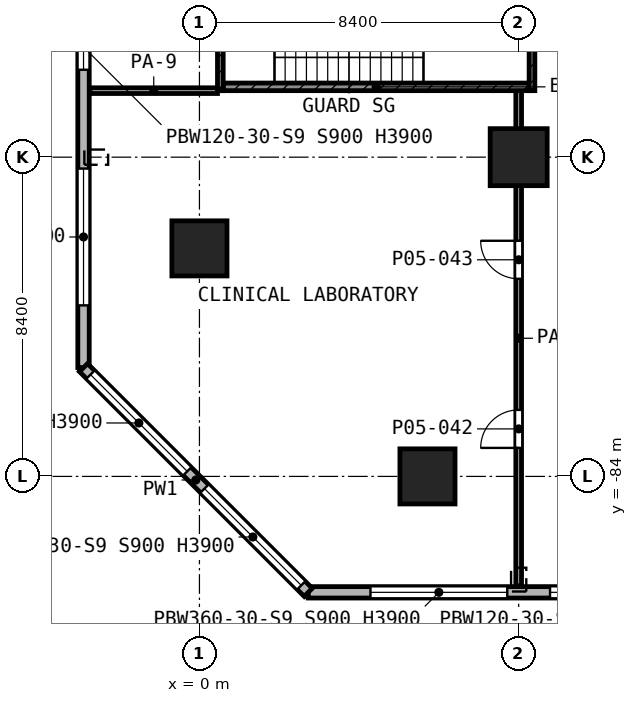
"""IFC4 building model, lengths in metres.
Left out: names, types, materials, properties, quantities, classifications, styles, units other than length and angle.
Written with IfcOpenShell. Run it as: python <this file> out.ifc"""

import sys

from ifc_helpers import new_model, si_unit, direction, frame, frame_2d, origin, origin_2d, place, context, subcontext, project, spatial, rectangle, extrude, element, fill, save


model = new_model("IFC4")
c1 = context("Model", 3, precision=1e-05, world=origin(), true_north=direction((0.0, 1.0)))
c2 = subcontext(c1, "Body", "Model", "MODEL_VIEW")
j1 = project(units=[si_unit("LENGTHUNIT", "METRE"), si_unit("PLANEANGLEUNIT", "RADIAN")], contexts=[c1])
p1 = place(None, origin())
s1 = spatial("IfcSite", under=j1, at=p1, CompositionType="ELEMENT")
p2 = place(p1, origin())
s2 = spatial("IfcBuilding", under=s1, at=p2, CompositionType="ELEMENT")
p3 = place(p2, frame((0.0, 0.0, 23.8)))
s3 = spatial("IfcBuildingStorey", under=s2, at=p3, CompositionType="ELEMENT", Elevation=23.8)
p4 = place(p3, frame((8.4, -75.6, 0.0), z_axis=(0.0, 0.0, 1.0), x_axis=(1.0, 0.0, 0.0)))
e1 = element("IfcColumn", 1, at=p4, inside=s3, PredefinedType="COLUMN", context=c2, shape_type="SweptSolid", body=[
    extrude(rectangle(XDim=1.5, YDim=1.5, at=origin_2d()), origin(), (0.0, 0.0, 1.0), 5.2),
])
for number, where, z_axis, x_axis in (
    (2, (0.0, -78.0, 0.0), (0.0, 0.0, 1.0), (1.0, 0.0, 0.0)),
    (3, (6.0, -84.0, 0.0), (0.0, 0.0, 1.0), (1.0, 0.0, 0.0)),
):
    element("IfcColumn", number, at=place(p3, frame(where, z_axis=z_axis, x_axis=x_axis)), inside=s3, PredefinedType="COLUMN", context=c2, shape_type="SweptSolid", body=[
        extrude(rectangle(XDim=1.45, YDim=1.45, at=origin_2d()), origin(), (0.0, 0.0, 1.0), 5.2),
    ])
p5 = place(p3, frame((-3.05, -2.862, 0.0), z_axis=(0.0, 0.0, 1.0), x_axis=(0.0, -1.0, 0.0)))
e4 = element("IfcWall", 4, at=p5, inside=s3, PredefinedType="SOLIDWALL", context=c2, shape_type="SweptSolid", body=[
    extrude(rectangle(XDim=78.276, YDim=0.3, at=frame_2d((39.138, 0.0))), origin(), (0.0, 0.0, 1.0), 4.85),
])
p6 = place(p5, frame((1.638, 0.0, 0.9)))
e5 = element("IfcOpeningElement", 5, at=p6, cuts=e4, PredefinedType="OPENING", context=c2, shape_type="SweptSolid", body=[
    extrude(rectangle(XDim=3.6, YDim=3.0, at=frame_2d((1.8, 1.5))), frame((0.0, 0.16, 0.0), z_axis=(0.0, -1.0, 0.0), x_axis=(1.0, 0.0, 0.0)), (0.0, 0.0, 1.0), 0.32),
])
p7 = place(p5, frame((5.838, 0.0, 0.9)))
e6 = element("IfcOpeningElement", 6, at=p7, cuts=e4, PredefinedType="OPENING", context=c2, shape_type="SweptSolid", body=[
    extrude(rectangle(XDim=3.6, YDim=3.0, at=frame_2d((1.8, 1.5))), frame((0.0, 0.16, 0.0), z_axis=(0.0, -1.0, 0.0), x_axis=(1.0, 0.0, 0.0)), (0.0, 0.0, 1.0), 0.32),
])
p8 = place(p5, frame((10.038, 0.0, 0.9)))
e7 = element("IfcOpeningElement", 7, at=p8, cuts=e4, PredefinedType="OPENING", context=c2, shape_type="SweptSolid", body=[
    extrude(rectangle(XDim=3.6, YDim=3.0, at=frame_2d((1.8, 1.5))), frame((0.0, 0.16, 0.0), z_axis=(0.0, -1.0, 0.0), x_axis=(1.0, 0.0, 0.0)), (0.0, 0.0, 1.0), 0.32),
])
p9 = place(p5, frame((14.238, 0.0, 0.9)))
e8 = element("IfcOpeningElement", 8, at=p9, cuts=e4, PredefinedType="OPENING", context=c2, shape_type="SweptSolid", body=[
    extrude(rectangle(XDim=3.6, YDim=3.0, at=frame_2d((1.8, 1.5))), frame((0.0, 0.16, 0.0), z_axis=(0.0, -1.0, 0.0), x_axis=(1.0, 0.0, 0.0)), (0.0, 0.0, 1.0), 0.32),
])
p10 = place(p5, frame((18.438, 0.0, 0.9)))
e9 = element("IfcOpeningElement", 9, at=p10, cuts=e4, PredefinedType="OPENING", context=c2, shape_type="SweptSolid", body=[
    extrude(rectangle(XDim=3.6, YDim=3.0, at=frame_2d((1.8, 1.5))), frame((0.0, 0.16, 0.0), z_axis=(0.0, -1.0, 0.0), x_axis=(1.0, 0.0, 0.0)), (0.0, 0.0, 1.0), 0.32),
])
p11 = place(p5, frame((22.638, 0.0, 0.9)))
e10 = element("IfcOpeningElement", 10, at=p11, cuts=e4, PredefinedType="OPENING", context=c2, shape_type="SweptSolid", body=[
    extrude(rectangle(XDim=3.6, YDim=3.0, at=frame_2d((1.8, 1.5))), frame((0.0, 0.16, 0.0), z_axis=(0.0, -1.0, 0.0), x_axis=(1.0, 0.0, 0.0)), (0.0, 0.0, 1.0), 0.32),
])
p12 = place(p5, frame((27.653, 0.0, 0.9)))
e11 = element("IfcOpeningElement", 11, at=p12, cuts=e4, PredefinedType="OPENING", context=c2, shape_type="SweptSolid", body=[
    extrude(rectangle(XDim=2.4, YDim=3.0, at=frame_2d((1.2, 1.5))), frame((0.0, 0.16, 0.0), z_axis=(0.0, -1.0, 0.0), x_axis=(1.0, 0.0, 0.0)), (0.0, 0.0, 1.0), 0.32),
])
p13 = place(p5, frame((31.553, 0.0, 0.9)))
e12 = element("IfcOpeningElement", 12, at=p13, cuts=e4, PredefinedType="OPENING", context=c2, shape_type="SweptSolid", body=[
    extrude(rectangle(XDim=2.4, YDim=3.0, at=frame_2d((1.2, 1.5))), frame((0.0, 0.16, 0.0), z_axis=(0.0, -1.0, 0.0), x_axis=(1.0, 0.0, 0.0)), (0.0, 0.0, 1.0), 0.32),
])
p14 = place(p5, frame((35.238, 0.0, 0.9)))
e13 = element("IfcOpeningElement", 13, at=p14, cuts=e4, PredefinedType="OPENING", context=c2, shape_type="SweptSolid", body=[
    extrude(rectangle(XDim=3.6, YDim=3.0, at=frame_2d((1.8, 1.5))), frame((0.0, 0.16, 0.0), z_axis=(0.0, -1.0, 0.0), x_axis=(1.0, 0.0, 0.0)), (0.0, 0.0, 1.0), 0.32),
])
p15 = place(p5, frame((39.438, 0.0, 0.9)))
e14 = element("IfcOpeningElement", 14, at=p15, cuts=e4, PredefinedType="OPENING", context=c2, shape_type="SweptSolid", body=[
    extrude(rectangle(XDim=3.6, YDim=3.0, at=frame_2d((1.8, 1.5))), frame((0.0, 0.16, 0.0), z_axis=(0.0, -1.0, 0.0), x_axis=(1.0, 0.0, 0.0)), (0.0, 0.0, 1.0), 0.32),
])
p16 = place(p5, frame((44.323, 0.0, 0.9)))
e15 = element("IfcOpeningElement", 15, at=p16, cuts=e4, PredefinedType="OPENING", context=c2, shape_type="SweptSolid", body=[
    extrude(rectangle(XDim=2.4, YDim=3.0, at=frame_2d((1.2, 1.5))), frame((0.0, 0.16, 0.0), z_axis=(0.0, -1.0, 0.0), x_axis=(1.0, 0.0, 0.0)), (0.0, 0.0, 1.0), 0.32),
])
p17 = place(p5, frame((48.203, 0.0, 0.9)))
e16 = element("IfcOpeningElement", 16, at=p17, cuts=e4, PredefinedType="OPENING", context=c2, shape_type="SweptSolid", body=[
    extrude(rectangle(XDim=2.4, YDim=3.0, at=frame_2d((1.2, 1.5))), frame((0.0, 0.16, 0.0), z_axis=(0.0, -1.0, 0.0), x_axis=(1.0, 0.0, 0.0)), (0.0, 0.0, 1.0), 0.32),
])
p18 = place(p5, frame((52.038, 0.0, 0.9)))
e17 = element("IfcOpeningElement", 17, at=p18, cuts=e4, PredefinedType="OPENING", context=c2, shape_type="SweptSolid", body=[
    extrude(rectangle(XDim=3.6, YDim=3.0, at=frame_2d((1.8, 1.5))), frame((0.0, 0.16, 0.0), z_axis=(0.0, -1.0, 0.0), x_axis=(1.0, 0.0, 0.0)), (0.0, 0.0, 1.0), 0.32),
])
p19 = place(p5, frame((56.238, 0.0, 0.9)))
e18 = element("IfcOpeningElement", 18, at=p19, cuts=e4, PredefinedType="OPENING", context=c2, shape_type="SweptSolid", body=[
    extrude(rectangle(XDim=3.6, YDim=3.0, at=frame_2d((1.8, 1.5))), frame((0.0, 0.16, 0.0), z_axis=(0.0, -1.0, 0.0), x_axis=(1.0, 0.0, 0.0)), (0.0, 0.0, 1.0), 0.32),
])
p20 = place(p5, frame((60.438, 0.0, 0.9)))
e19 = element("IfcOpeningElement", 19, at=p20, cuts=e4, PredefinedType="OPENING", context=c2, shape_type="SweptSolid", body=[
    extrude(rectangle(XDim=3.6, YDim=3.0, at=frame_2d((1.8, 1.5))), frame((0.0, 0.16, 0.0), z_axis=(0.0, -1.0, 0.0), x_axis=(1.0, 0.0, 0.0)), (0.0, 0.0, 1.0), 0.32),
])
p21 = place(p5, frame((64.638, 0.0, 0.9)))
e20 = element("IfcOpeningElement", 20, at=p21, cuts=e4, PredefinedType="OPENING", context=c2, shape_type="SweptSolid", body=[
    extrude(rectangle(XDim=3.6, YDim=3.0, at=frame_2d((1.8, 1.5))), frame((0.0, 0.16, 0.0), z_axis=(0.0, -1.0, 0.0), x_axis=(1.0, 0.0, 0.0)), (0.0, 0.0, 1.0), 0.32),
])
p22 = place(p5, frame((69.238, 0.0, 0.9)))
e21 = element("IfcOpeningElement", 21, at=p22, cuts=e4, PredefinedType="OPENING", context=c2, shape_type="SweptSolid", body=[
    extrude(rectangle(XDim=1.2, YDim=3.0, at=frame_2d((0.6, 1.5))), frame((0.0, 0.16, 0.0), z_axis=(0.0, -1.0, 0.0), x_axis=(1.0, 0.0, 0.0)), (0.0, 0.0, 1.0), 0.32),
])
p23 = place(p5, frame((73.038, 0.0, 0.9)))
e22 = element("IfcOpeningElement", 22, at=p23, cuts=e4, PredefinedType="OPENING", context=c2, shape_type="SweptSolid", body=[
    extrude(rectangle(XDim=3.6, YDim=3.0, at=frame_2d((1.8, 1.5))), frame((0.0, 0.16, 0.0), z_axis=(0.0, -1.0, 0.0), x_axis=(1.0, 0.0, 0.0)), (0.0, 0.0, 1.0), 0.32),
])
p24 = place(p3, frame((-3.05, -81.138, 0.0), z_axis=(0.0, 0.0, 1.0), x_axis=(0.707106781187, -0.707106781187, 0.0)))
e23 = element("IfcWall", 23, at=p24, inside=s3, PredefinedType="SOLIDWALL", context=c2, shape_type="SweptSolid", body=[
    extrude(rectangle(XDim=8.361, YDim=0.3, at=frame_2d((4.181, 0.0))), origin(), (0.0, 0.0, 1.0), 4.85),
])
p25 = place(p24, frame((0.259, 0.0, 0.9)))
e24 = element("IfcOpeningElement", 24, at=p25, cuts=e23, PredefinedType="OPENING", context=c2, shape_type="SweptSolid", body=[
    extrude(rectangle(XDim=3.6, YDim=3.0, at=frame_2d((1.8, 1.5))), frame((0.0, 0.16, 0.0), z_axis=(0.0, -1.0, 0.0), x_axis=(1.0, 0.0, 0.0)), (0.0, 0.0, 1.0), 0.32),
])
p26 = place(p24, frame((4.502, 0.0, 0.9)))
e25 = element("IfcOpeningElement", 25, at=p26, cuts=e23, PredefinedType="OPENING", context=c2, shape_type="SweptSolid", body=[
    extrude(rectangle(XDim=3.6, YDim=3.0, at=frame_2d((1.8, 1.5))), frame((0.0, 0.16, 0.0), z_axis=(0.0, -1.0, 0.0), x_axis=(1.0, 0.0, 0.0)), (0.0, 0.0, 1.0), 0.32),
])
p27 = place(p3, frame((2.862, -87.05, 0.0), z_axis=(0.0, 0.0, 1.0), x_axis=(1.0, 0.0, 0.0)))
e26 = element("IfcWall", 26, at=p27, inside=s3, PredefinedType="SOLIDWALL", context=c2, shape_type="SweptSolid", body=[
    extrude(rectangle(XDim=27.876, YDim=0.3, at=frame_2d((13.938, 0.0))), origin(), (0.0, 0.0, 1.0), 4.85),
])
p28 = place(p27, frame((1.638, 0.0, 0.9)))
e27 = element("IfcOpeningElement", 27, at=p28, cuts=e26, PredefinedType="OPENING", context=c2, shape_type="SweptSolid", body=[
    extrude(rectangle(XDim=3.6, YDim=3.0, at=frame_2d((1.8, 1.5))), frame((0.0, 0.16, 0.0), z_axis=(0.0, -1.0, 0.0), x_axis=(1.0, 0.0, 0.0)), (0.0, 0.0, 1.0), 0.32),
])
p29 = place(p27, frame((6.363, 0.0, 0.9)))
e28 = element("IfcOpeningElement", 28, at=p29, cuts=e26, PredefinedType="OPENING", context=c2, shape_type="SweptSolid", body=[
    extrude(rectangle(XDim=1.2, YDim=3.0, at=frame_2d((0.6, 1.5))), frame((0.0, 0.16, 0.0), z_axis=(0.0, -1.0, 0.0), x_axis=(1.0, 0.0, 0.0)), (0.0, 0.0, 1.0), 0.32),
])
p30 = place(p27, frame((10.038, 0.0, 0.9)))
e29 = element("IfcOpeningElement", 29, at=p30, cuts=e26, PredefinedType="OPENING", context=c2, shape_type="SweptSolid", body=[
    extrude(rectangle(XDim=3.6, YDim=3.0, at=frame_2d((1.8, 1.5))), frame((0.0, 0.16, 0.0), z_axis=(0.0, -1.0, 0.0), x_axis=(1.0, 0.0, 0.0)), (0.0, 0.0, 1.0), 0.32),
])
p31 = place(p27, frame((14.238, 0.0, 0.9)))
e30 = element("IfcOpeningElement", 30, at=p31, cuts=e26, PredefinedType="OPENING", context=c2, shape_type="SweptSolid", body=[
    extrude(rectangle(XDim=3.6, YDim=3.0, at=frame_2d((1.8, 1.5))), frame((0.0, 0.16, 0.0), z_axis=(0.0, -1.0, 0.0), x_axis=(1.0, 0.0, 0.0)), (0.0, 0.0, 1.0), 0.32),
])
p32 = place(p27, frame((18.438, 0.0, 0.9)))
e31 = element("IfcOpeningElement", 31, at=p32, cuts=e26, PredefinedType="OPENING", context=c2, shape_type="SweptSolid", body=[
    extrude(rectangle(XDim=3.6, YDim=3.0, at=frame_2d((1.8, 1.5))), frame((0.0, 0.16, 0.0), z_axis=(0.0, -1.0, 0.0), x_axis=(1.0, 0.0, 0.0)), (0.0, 0.0, 1.0), 0.32),
])
p33 = place(p27, frame((22.638, 0.0, 0.9)))
e32 = element("IfcOpeningElement", 32, at=p33, cuts=e26, PredefinedType="OPENING", context=c2, shape_type="SweptSolid", body=[
    extrude(rectangle(XDim=3.6, YDim=3.0, at=frame_2d((1.8, 1.5))), frame((0.0, 0.16, 0.0), z_axis=(0.0, -1.0, 0.0), x_axis=(1.0, 0.0, 0.0)), (0.0, 0.0, 1.0), 0.32),
])
p34 = place(p3, frame((0.55, -73.85, 0.0), z_axis=(0.0, 0.0, 1.0), x_axis=(0.0, 1.0, 0.0)))
e33 = element("IfcWall", 33, at=p34, inside=s3, PredefinedType="SHEAR", context=c2, shape_type="SweptSolid", body=[
    extrude(rectangle(XDim=5.95, YDim=0.15, at=frame_2d((2.975, 0.0))), origin(), (0.0, 0.0, 1.0), 4.85),
])
p35 = place(p3, frame((8.75, -73.85, 0.0), z_axis=(0.0, 0.0, 1.0), x_axis=(0.0, 1.0, 0.0)))
e34 = element("IfcWall", 34, at=p35, inside=s3, PredefinedType="SHEAR", context=c2, shape_type="SweptSolid", body=[
    extrude(rectangle(XDim=5.9, YDim=0.15, at=frame_2d((2.95, 0.0))), origin(), (0.0, 0.0, 1.0), 4.85),
])
p36 = place(p35, frame((3.925, 0.0, 0.0)))
e35 = element("IfcOpeningElement", 35, at=p36, cuts=e34, PredefinedType="OPENING", context=c2, shape_type="SweptSolid", body=[
    extrude(rectangle(XDim=1.1, YDim=2.1, at=frame_2d((0.55, 1.05))), frame((0.0, 0.085, 0.0), z_axis=(0.0, -1.0, 0.0), x_axis=(1.0, 0.0, 0.0)), (0.0, 0.0, 1.0), 0.17),
])
p37 = place(p3, frame((0.625, -73.75, 0.0), z_axis=(0.0, 0.0, 1.0), x_axis=(1.0, 0.0, 0.0)))
e36 = element("IfcWall", 36, at=p37, inside=s3, PredefinedType="SHEAR", context=c2, shape_type="SweptSolid", body=[
    extrude(rectangle(XDim=8.05, YDim=0.2, at=frame_2d((4.025, 0.0))), origin(), (0.0, 0.0, 1.0), 4.85),
])
p38 = place(p3, frame((-2.88, -73.85, 0.0), z_axis=(0.0, 0.0, 1.0), x_axis=(1.0, 0.0, 0.0)))
e37 = element("IfcWall", 37, at=p38, inside=s3, PredefinedType="PARTITIONING", context=c2, shape_type="SweptSolid", body=[
    extrude(rectangle(XDim=3.355, YDim=0.15, at=frame_2d((1.677, 0.0))), origin(), (0.0, 0.0, 1.0), 3.45),
])
p39 = place(p3, frame((8.4, -86.88, 0.0), z_axis=(0.0, 0.0, 1.0), x_axis=(0.0, 1.0, 0.0)))
e38 = element("IfcWall", 38, at=p39, inside=s3, PredefinedType="PARTITIONING", context=c2, shape_type="SweptSolid", body=[
    extrude(rectangle(XDim=13.03, YDim=0.15, at=frame_2d((6.515, 0.0))), origin(), (0.0, 0.0, 1.0), 3.45),
])
p40 = place(p39, frame((3.63, 0.0, 0.0)))
e39 = element("IfcOpeningElement", 39, at=p40, cuts=e38, PredefinedType="OPENING", context=c2, shape_type="SweptSolid", body=[
    extrude(rectangle(XDim=1.0, YDim=2.1, at=frame_2d((0.5, 1.05))), frame((0.0, 0.085, 0.0), z_axis=(0.0, -1.0, 0.0), x_axis=(1.0, 0.0, 0.0)), (0.0, 0.0, 1.0), 0.17),
])
p41 = place(p39, frame((8.08, 0.0, 0.0)))
e40 = element("IfcOpeningElement", 40, at=p41, cuts=e38, PredefinedType="OPENING", context=c2, shape_type="SweptSolid", body=[
    extrude(rectangle(XDim=1.0, YDim=2.1, at=frame_2d((0.5, 1.05))), frame((0.0, 0.085, 0.0), z_axis=(0.0, -1.0, 0.0), x_axis=(1.0, 0.0, 0.0)), (0.0, 0.0, 1.0), 0.17),
])
p42 = place(p22, origin())
e41 = element("IfcWindow", 41, at=p42, inside=s3, PartitioningType="SINGLE_PANEL", PredefinedType="WINDOW", context=c2, shape_type="SweptSolid", body=[
    extrude(rectangle(XDim=1.2, YDim=3.0, at=frame_2d((0.6, 1.5))), frame((0.0, 0.03, 0.0), z_axis=(0.0, -1.0, 0.0), x_axis=(1.0, 0.0, 0.0)), (0.0, 0.0, 1.0), 0.06),
])
fill(e21, e41)
p43 = place(p23, origin())
e42 = element("IfcWindow", 42, at=p43, inside=s3, PartitioningType="SINGLE_PANEL", PredefinedType="WINDOW", context=c2, shape_type="SweptSolid", body=[
    extrude(rectangle(XDim=3.6, YDim=3.0, at=frame_2d((1.8, 1.5))), frame((0.0, 0.03, 0.0), z_axis=(0.0, -1.0, 0.0), x_axis=(1.0, 0.0, 0.0)), (0.0, 0.0, 1.0), 0.06),
])
fill(e22, e42)
p44 = place(p25, origin())
e43 = element("IfcWindow", 43, at=p44, inside=s3, PartitioningType="SINGLE_PANEL", PredefinedType="WINDOW", context=c2, shape_type="SweptSolid", body=[
    extrude(rectangle(XDim=3.6, YDim=3.0, at=frame_2d((1.8, 1.5))), frame((0.0, 0.03, 0.0), z_axis=(0.0, -1.0, 0.0), x_axis=(1.0, 0.0, 0.0)), (0.0, 0.0, 1.0), 0.06),
])
fill(e24, e43)
p45 = place(p26, origin())
e44 = element("IfcWindow", 44, at=p45, inside=s3, PartitioningType="SINGLE_PANEL", PredefinedType="WINDOW", context=c2, shape_type="SweptSolid", body=[
    extrude(rectangle(XDim=3.6, YDim=3.0, at=frame_2d((1.8, 1.5))), frame((0.0, 0.03, 0.0), z_axis=(0.0, -1.0, 0.0), x_axis=(1.0, 0.0, 0.0)), (0.0, 0.0, 1.0), 0.06),
])
fill(e25, e44)
p46 = place(p28, origin())
e45 = element("IfcWindow", 45, at=p46, inside=s3, PartitioningType="SINGLE_PANEL", PredefinedType="WINDOW", context=c2, shape_type="SweptSolid", body=[
    extrude(rectangle(XDim=3.6, YDim=3.0, at=frame_2d((1.8, 1.5))), frame((0.0, 0.03, 0.0), z_axis=(0.0, -1.0, 0.0), x_axis=(1.0, 0.0, 0.0)), (0.0, 0.0, 1.0), 0.06),
])
fill(e27, e45)
p47 = place(p29, origin())
e46 = element("IfcWindow", 46, at=p47, inside=s3, PartitioningType="SINGLE_PANEL", PredefinedType="WINDOW", context=c2, shape_type="SweptSolid", body=[
    extrude(rectangle(XDim=1.2, YDim=3.0, at=frame_2d((0.6, 1.5))), frame((0.0, 0.03, 0.0), z_axis=(0.0, -1.0, 0.0), x_axis=(1.0, 0.0, 0.0)), (0.0, 0.0, 1.0), 0.06),
])
fill(e28, e46)
p48 = place(p40, origin())
e47 = element("IfcDoor", 47, at=p48, inside=s3, OperationType="SINGLE_SWING_LEFT", PredefinedType="DOOR", context=c2, shape_type="SweptSolid", body=[
    extrude(rectangle(XDim=1.0, YDim=2.1, at=frame_2d((0.5, 1.05))), frame((0.0, 0.025, 0.0), z_axis=(0.0, -1.0, 0.0), x_axis=(1.0, 0.0, 0.0)), (0.0, 0.0, 1.0), 0.05),
])
fill(e39, e47)
p49 = place(p41, origin())
e48 = element("IfcDoor", 48, at=p49, inside=s3, OperationType="SINGLE_SWING_RIGHT", PredefinedType="DOOR", context=c2, shape_type="SweptSolid", body=[
    extrude(rectangle(XDim=1.0, YDim=2.1, at=frame_2d((0.5, 1.05))), frame((0.0, 0.025, 0.0), z_axis=(0.0, -1.0, 0.0), x_axis=(1.0, 0.0, 0.0)), (0.0, 0.0, 1.0), 0.05),
])
fill(e40, e48)
save(model, sys.argv[1])
